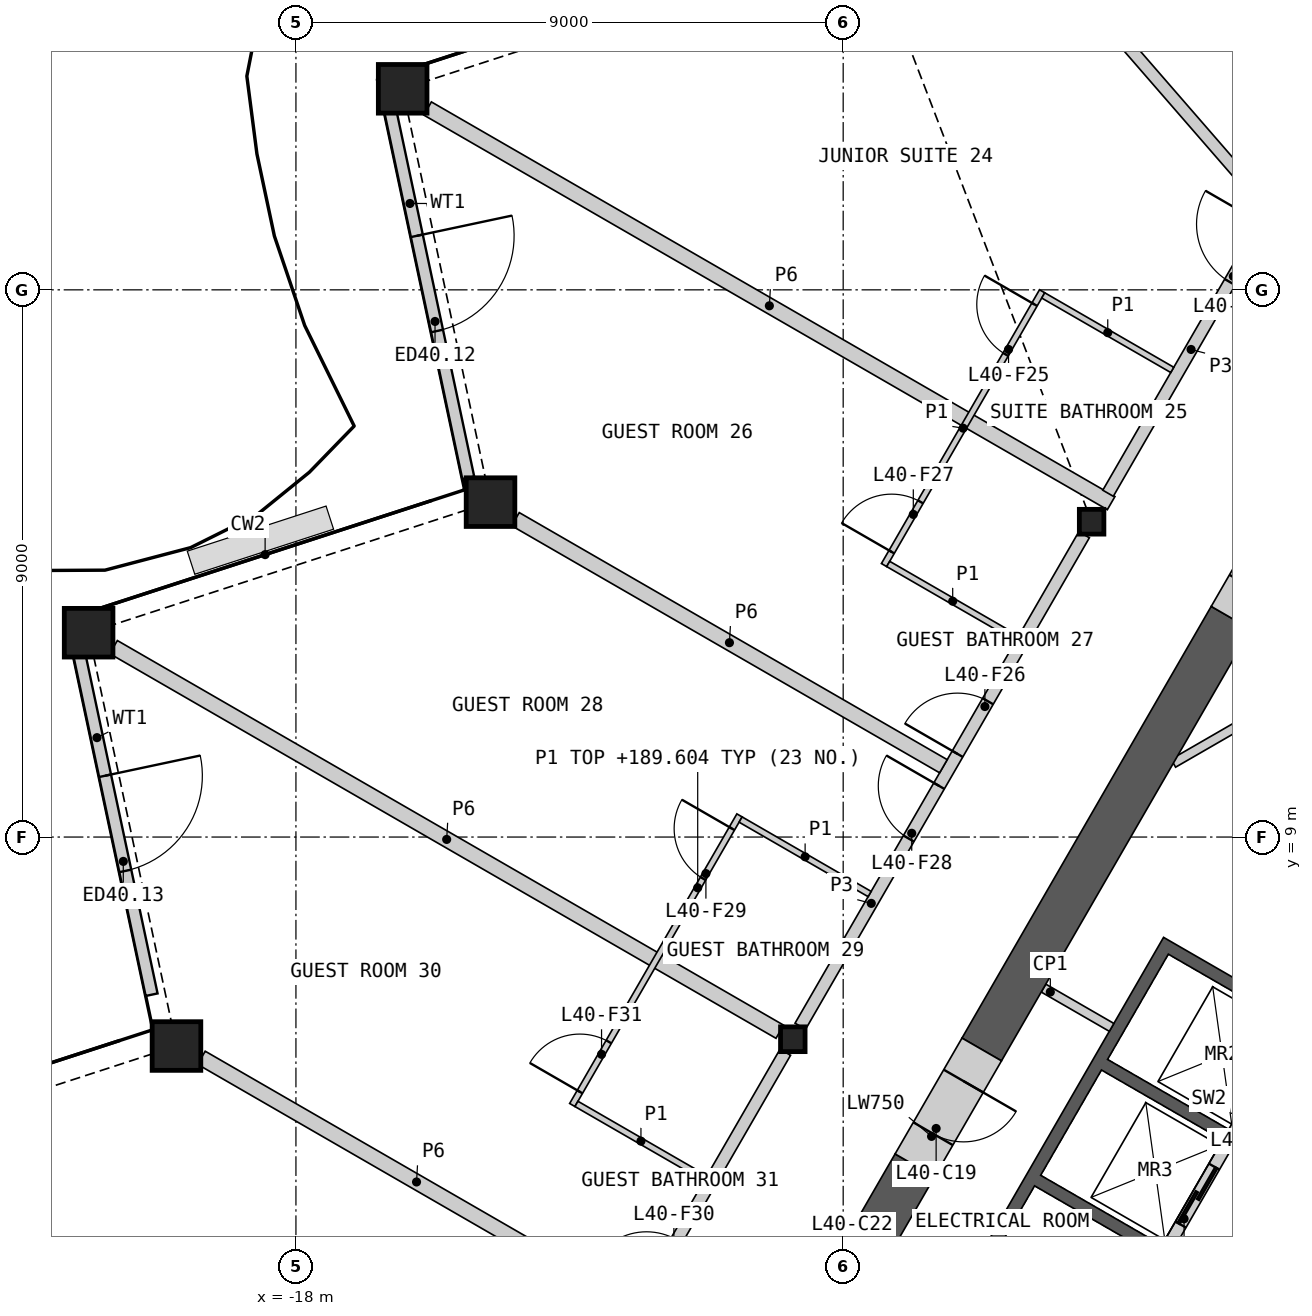
"""IFC4 building model, lengths in metres.
Left out: names, types, materials, properties, quantities, classifications, styles, units other than length and angle.
Written with IfcOpenShell. Run it as: python <this file> out.ifc"""

import sys

from ifc_helpers import new_model, si_unit, direction, frame, frame_2d, origin, origin_2d, place, context, subcontext, project, spatial, polyline, rectangle, hollow_rectangle, i_section, outline, extrude, element, fill, save


model = new_model("IFC4")
c1 = context("Model", 3, precision=1e-05, world=origin(), true_north=direction((0.0, 1.0)))
c2 = subcontext(c1, "Body", "Model", "MODEL_VIEW")
j1 = project(units=[si_unit("LENGTHUNIT", "METRE"), si_unit("PLANEANGLEUNIT", "RADIAN")], contexts=[c1])
p1 = place(None, origin())
s1 = spatial("IfcSite", under=j1, at=p1, CompositionType="ELEMENT")
p2 = place(p1, origin())
s2 = spatial("IfcBuilding", under=s1, at=p2, CompositionType="ELEMENT")
p3 = place(p2, frame((0.0, 0.0, 187.2)))
s3 = spatial("IfcBuildingStorey", under=s2, at=p3, CompositionType="ELEMENT", Elevation=187.2)
for number, where, z_axis, x_axis in (
    (1, (-16.245, 21.306, 0.0), (0.0, 0.0, 1.0), (1.0, 0.0, 0.0)),
    (2, (-14.8, 14.508, 0.0), (0.0, 0.0, 1.0), (1.0, 0.0, 0.0)),
    (3, (-21.409, 12.361, 0.0), (0.0, 0.0, 1.0), (1.0, 0.0, 0.0)),
    (4, (-19.965, 5.563, 0.0), (0.0, 0.0, 1.0), (1.0, 0.0, 0.0)),
):
    element("IfcColumn", number, at=place(p3, frame(where, z_axis=z_axis, x_axis=x_axis)), inside=s3, PredefinedType="COLUMN", context=c2, shape_type="SweptSolid", body=[
        extrude(hollow_rectangle(XDim=0.8, YDim=0.8, WallThickness=0.05, at=origin_2d()), origin(), (0.0, 0.0, 1.0), 3.6),
    ])
for number, where, z_axis, x_axis in (
    (5, (-4.914, 14.186, 0.0), (0.0, 0.0, 1.0), (1.0, 0.0, 0.0)),
    (6, (-9.828, 5.675, 0.0), (0.0, 0.0, 1.0), (1.0, 0.0, 0.0)),
):
    element("IfcColumn", number, at=place(p3, frame(where, z_axis=z_axis, x_axis=x_axis)), inside=s3, PredefinedType="COLUMN", context=c2, shape_type="SweptSolid", body=[
        extrude(i_section(OverallWidth=0.404, OverallDepth=0.407, WebThickness=0.027, FlangeThickness=0.044, at=origin_2d()), origin(), (0.0, 0.0, 1.0), 3.6),
    ])
p4 = place(p3, frame((-16.445, 20.925, 0.0), z_axis=(0.0, 0.0, 1.0), x_axis=(0.20791050027, -0.978147853792, 0.0)))
e7 = element("IfcWall", 7, at=p4, inside=s3, PredefinedType="SOLIDWALL", context=c2, shape_type="SweptSolid", body=[
    extrude(rectangle(XDim=6.151, YDim=0.2, at=frame_2d((3.075, 0.0))), origin(), (0.0, 0.0, 1.0), 2.701),
])
p5 = place(p4, frame((2.082, 0.0, 0.0)))
e8 = element("IfcOpeningElement", 8, at=p5, cuts=e7, PredefinedType="OPENING", context=c2, shape_type="SweptSolid", body=[
    extrude(rectangle(XDim=1.6, YDim=2.4, at=frame_2d((0.8, 1.2))), frame((0.0, 0.11, 0.0), z_axis=(0.0, -1.0, 0.0), x_axis=(1.0, 0.0, 0.0)), (0.0, 0.0, 1.0), 0.22),
])
p6 = place(p3, frame((-21.572, 12.044, 0.0), z_axis=(0.0, 0.0, 1.0), x_axis=(0.207914487103, -0.978147006361, 0.0)))
e9 = element("IfcWall", 9, at=p6, inside=s3, PredefinedType="SOLIDWALL", context=c2, shape_type="SweptSolid", body=[
    extrude(rectangle(XDim=5.763, YDim=0.2, at=frame_2d((2.882, 0.0))), origin(), (0.0, 0.0, 1.0), 2.701),
])
p7 = place(p6, frame((2.082, 0.0, 0.0)))
e10 = element("IfcOpeningElement", 10, at=p7, cuts=e9, PredefinedType="OPENING", context=c2, shape_type="SweptSolid", body=[
    extrude(rectangle(XDim=1.6, YDim=2.4, at=frame_2d((0.8, 1.2))), frame((0.0, 0.11, 0.0), z_axis=(0.0, -1.0, 0.0), x_axis=(1.0, 0.0, 0.0)), (0.0, 0.0, 1.0), 0.22),
])
p8 = place(p3, origin())
e11 = element("IfcWall", 11, at=p8, inside=s3, PredefinedType="SHEAR", context=c2, shape_type="SweptSolid", body=[
    extrude(outline(polyline([(-4.96, 0.208), (-7.131, 1.461), (-3.731, 7.35), (-1.561, 6.097), (-1.66, 5.924), (-3.652, 7.074), (-4.652, 5.342), (-2.66, 4.192), (-2.76, 4.019), (-4.752, 5.169), (-5.752, 3.437), (-3.76, 2.287), (-3.861, 2.113), (-5.852, 3.263), (-6.852, 1.531), (-4.861, 0.381), (-4.96, 0.208)])), origin(), (0.0, 0.0, 1.0), 3.25),
])
p9 = place(p3, frame((-1.631, 5.776, 0.0), z_axis=(0.0, 0.0, 1.0), x_axis=(-0.499992876559, -0.866029516466, 0.0)))
e12 = element("IfcWall", 12, at=p9, inside=s3, PredefinedType="SOLIDWALL", context=c2, shape_type="SweptSolid", body=[
    extrude(rectangle(XDim=6.486, YDim=0.2, at=frame_2d((3.243, 0.0))), origin(), (0.0, 0.0, 1.0), 3.25),
])
p10 = place(p9, frame((0.337, 0.0, 0.0)))
e13 = element("IfcOpeningElement", 13, at=p10, cuts=e12, PredefinedType="OPENING", context=c2, shape_type="SweptSolid", body=[
    extrude(rectangle(XDim=1.1, YDim=2.1, at=frame_2d((0.55, 1.05))), frame((0.0, 0.11, 0.0), z_axis=(0.0, -1.0, 0.0), x_axis=(1.0, 0.0, 0.0)), (0.0, 0.0, 1.0), 0.22),
])
p11 = place(p9, frame((2.537, 0.0, 0.0)))
e14 = element("IfcOpeningElement", 14, at=p11, cuts=e12, PredefinedType="OPENING", context=c2, shape_type="SweptSolid", body=[
    extrude(rectangle(XDim=1.1, YDim=2.1, at=frame_2d((0.55, 1.05))), frame((0.0, 0.11, 0.0), z_axis=(0.0, -1.0, 0.0), x_axis=(1.0, 0.0, 0.0)), (0.0, 0.0, 1.0), 0.22),
])
p12 = place(p3, frame((-5.705, 6.516, 0.0), z_axis=(0.0, 0.0, 1.0), x_axis=(0.866003189247, -0.500038474733, 0.0)))
e15 = element("IfcWall", 15, at=p12, inside=s3, PredefinedType="PARTITIONING", context=c2, shape_type="SweptSolid", body=[
    extrude(rectangle(XDim=1.293, YDim=0.15, at=frame_2d((0.646, 0.0))), origin(), (0.0, 0.0, 1.0), 3.25),
])
p13 = place(p3, frame((1.785, 13.306, 0.0), z_axis=(0.0, 0.0, 1.0), x_axis=(-0.866038319186, -0.499977629202, 0.0)))
e16 = element("IfcWall", 16, at=p13, inside=s3, PredefinedType="PARTITIONING", context=c2, shape_type="SweptSolid", body=[
    extrude(rectangle(XDim=6.184, YDim=0.15, at=frame_2d((3.092, 0.0))), origin(), (0.0, 0.0, 1.0), 3.25),
])
p14 = place(p3, frame((-2.622, 12.606, 0.0), z_axis=(0.0, 0.0, 1.0), x_axis=(-0.500014611105, -0.866016967894, 0.0)))
e17 = element("IfcWall", 17, at=p14, inside=s3, PredefinedType="SHEAR", context=c2, shape_type="SweptSolid", body=[
    extrude(rectangle(XDim=8.198, YDim=0.75, at=frame_2d((4.099, 0.0))), origin(), (0.0, 0.0, 1.0), 3.25),
])
p15 = place(p3, frame((-7.821, 3.601, 0.0), z_axis=(0.0, 0.0, 1.0), x_axis=(-0.49996263964, -0.866046972724, 0.0)))
e18 = element("IfcWall", 18, at=p15, inside=s3, PredefinedType="SHEAR", context=c2, shape_type="SweptSolid", body=[
    extrude(rectangle(XDim=1.408, YDim=0.75, at=frame_2d((0.704, 0.0))), origin(), (0.0, 0.0, 1.0), 3.25),
])
p16 = place(p3, frame((-6.721, 5.506, 0.0), z_axis=(0.0, 0.0, 1.0), x_axis=(-0.499946605688, -0.86605622881, 0.0)))
e19 = element("IfcWall", 19, at=p16, inside=s3, PredefinedType="SHEAR", context=c2, shape_type="SweptSolid", body=[
    extrude(rectangle(XDim=2.2, YDim=0.75, at=frame_2d((1.1, 0.0))), origin(), (0.0, 0.0, 1.0), 3.25),
])
p17 = place(p16, frame((0.6, 0.0, 0.0)))
e20 = element("IfcOpeningElement", 20, at=p17, cuts=e19, PredefinedType="OPENING", context=c2, shape_type="SweptSolid", body=[
    extrude(rectangle(XDim=1.0, YDim=2.1, at=frame_2d((0.5, 1.05))), frame((0.0, 0.385, 0.0), z_axis=(0.0, -1.0, 0.0), x_axis=(1.0, 0.0, 0.0)), (0.0, 0.0, 1.0), 0.77),
])
p18 = place(p3, frame((-1.522, 14.511, 0.0), z_axis=(0.0, 0.0, 1.0), x_axis=(-0.499946605688, -0.86605622881, 0.0)))
e21 = element("IfcWall", 21, at=p18, inside=s3, PredefinedType="SHEAR", context=c2, shape_type="SweptSolid", body=[
    extrude(rectangle(XDim=2.2, YDim=0.75, at=frame_2d((1.1, 0.0))), origin(), (0.0, 0.0, 1.0), 3.25),
])
p19 = place(p18, frame((0.6, 0.0, 0.0)))
e22 = element("IfcOpeningElement", 22, at=p19, cuts=e21, PredefinedType="OPENING", context=c2, shape_type="SweptSolid", body=[
    extrude(rectangle(XDim=1.0, YDim=2.1, at=frame_2d((0.5, 1.05))), frame((0.0, 0.385, 0.0), z_axis=(0.0, -1.0, 0.0), x_axis=(1.0, 0.0, 0.0)), (0.0, 0.0, 1.0), 0.77),
])
p20 = place(p3, frame((-8.525, 2.382, 0.0), z_axis=(0.0, 0.0, 1.0), x_axis=(-0.500077893725, -0.86598042715, 0.0)))
e23 = element("IfcWall", 23, at=p20, inside=s3, PredefinedType="SHEAR", context=c2, shape_type="SweptSolid", body=[
    extrude(rectangle(XDim=2.2, YDim=0.75, at=frame_2d((1.1, 0.0))), origin(), (0.0, 0.0, 1.0), 3.25),
])
p21 = place(p20, frame((0.55, 0.0, 0.0)))
e24 = element("IfcOpeningElement", 24, at=p21, cuts=e23, PredefinedType="OPENING", context=c2, shape_type="SweptSolid", body=[
    extrude(rectangle(XDim=1.1, YDim=2.1, at=frame_2d((0.55, 1.05))), frame((0.0, 0.385, 0.0), z_axis=(0.0, -1.0, 0.0), x_axis=(1.0, 0.0, 0.0)), (0.0, 0.0, 1.0), 0.77),
])
p22 = place(p3, frame((-26.164, 3.265, 0.0), z_axis=(0.0, 0.0, 1.0), x_axis=(0.866021313335, -0.500007084799, 0.0)))
e25 = element("IfcWall", 25, at=p22, inside=s3, PredefinedType="PARTITIONING", context=c2, shape_type="SweptSolid", body=[
    extrude(rectangle(XDim=13.068, YDim=0.25, at=frame_2d((6.534, 0.0))), origin(), (0.0, 0.0, 1.0), 2.404),
])
p23 = place(p3, frame((-15.835, 20.983, 0.0), z_axis=(0.0, 0.0, 1.0), x_axis=(0.866022720283, -0.500004647933, 0.0)))
e26 = element("IfcWall", 26, at=p23, inside=s3, PredefinedType="PARTITIONING", context=c2, shape_type="SweptSolid", body=[
    extrude(rectangle(XDim=12.981, YDim=0.25, at=frame_2d((6.49, 0.0))), origin(), (0.0, 0.0, 1.0), 2.404),
])
p24 = place(p3, frame((-21.0, 12.124, 0.0), z_axis=(0.0, 0.0, 1.0), x_axis=(0.866025883649, -0.499999168849, 0.0)))
e27 = element("IfcWall", 27, at=p24, inside=s3, PredefinedType="PARTITIONING", context=c2, shape_type="SweptSolid", body=[
    extrude(rectangle(XDim=12.652, YDim=0.25, at=frame_2d((6.326, 0.0))), origin(), (0.0, 0.0, 1.0), 2.404),
])
p25 = place(p3, frame((-9.705, 5.888, 0.0), z_axis=(0.0, 0.0, 1.0), x_axis=(0.50000393355, 0.866023132736, 0.0)))
e28 = element("IfcWall", 28, at=p25, inside=s3, PredefinedType="PARTITIONING", context=c2, shape_type="SweptSolid", body=[
    extrude(rectangle(XDim=9.335, YDim=0.2, at=frame_2d((4.667, 0.0))), origin(), (0.0, 0.0, 1.0), 3.25),
])
p26 = place(p25, frame((5.172, 0.0, 0.0)))
e29 = element("IfcOpeningElement", 29, at=p26, cuts=e28, PredefinedType="OPENING", context=c2, shape_type="SweptSolid", body=[
    extrude(rectangle(XDim=1.0, YDim=2.1, at=frame_2d((0.5, 1.05))), frame((0.0, 0.11, 0.0), z_axis=(0.0, -1.0, 0.0), x_axis=(1.0, 0.0, 0.0)), (0.0, 0.0, 1.0), 0.22),
])
p27 = place(p25, frame((3.565, 0.0, 0.0)))
e30 = element("IfcOpeningElement", 30, at=p27, cuts=e28, PredefinedType="OPENING", context=c2, shape_type="SweptSolid", body=[
    extrude(rectangle(XDim=1.0, YDim=2.1, at=frame_2d((0.5, 1.05))), frame((0.0, 0.11, 0.0), z_axis=(0.0, -1.0, 0.0), x_axis=(1.0, 0.0, 0.0)), (0.0, 0.0, 1.0), 0.22),
])
p28 = place(p3, frame((-14.619, -2.624, 0.0), z_axis=(0.0, 0.0, 1.0), x_axis=(0.50000393355, 0.866023132736, 0.0)))
e31 = element("IfcWall", 31, at=p28, inside=s3, PredefinedType="PARTITIONING", context=c2, shape_type="SweptSolid", body=[
    extrude(rectangle(XDim=9.335, YDim=0.2, at=frame_2d((4.667, 0.0))), origin(), (0.0, 0.0, 1.0), 3.25),
])
p29 = place(p28, frame((4.77, 0.0, 0.0)))
e32 = element("IfcOpeningElement", 32, at=p29, cuts=e31, PredefinedType="OPENING", context=c2, shape_type="SweptSolid", body=[
    extrude(rectangle(XDim=1.0, YDim=2.1, at=frame_2d((0.5, 1.05))), frame((0.0, 0.11, 0.0), z_axis=(0.0, -1.0, 0.0), x_axis=(1.0, 0.0, 0.0)), (0.0, 0.0, 1.0), 0.22),
])
p30 = place(p28, frame((3.163, 0.0, 0.0)))
e33 = element("IfcOpeningElement", 33, at=p30, cuts=e31, PredefinedType="OPENING", context=c2, shape_type="SweptSolid", body=[
    extrude(rectangle(XDim=1.0, YDim=2.1, at=frame_2d((0.5, 1.05))), frame((0.0, 0.11, 0.0), z_axis=(0.0, -1.0, 0.0), x_axis=(1.0, 0.0, 0.0)), (0.0, 0.0, 1.0), 0.22),
])
p31 = place(p3, frame((-19.555, 5.37, 0.0), z_axis=(0.0, 0.0, 1.0), x_axis=(0.866024371346, -0.500001788232, 0.0)))
e34 = element("IfcWall", 34, at=p31, inside=s3, PredefinedType="PARTITIONING", context=c2, shape_type="SweptSolid", body=[
    extrude(rectangle(XDim=8.171, YDim=0.25, at=frame_2d((4.085, 0.0))), origin(), (0.0, 0.0, 1.0), 2.404),
])
p32 = place(p3, frame((-14.39, 14.228, 0.0), z_axis=(0.0, 0.0, 1.0), x_axis=(0.866031008936, -0.499990291468, 0.0)))
e35 = element("IfcWall", 35, at=p32, inside=s3, PredefinedType="PARTITIONING", context=c2, shape_type="SweptSolid", body=[
    extrude(rectangle(XDim=8.127, YDim=0.25, at=frame_2d((4.063, 0.0))), origin(), (0.0, 0.0, 1.0), 2.404),
])
p33 = place(p3, frame((-4.644, 14.655, 0.0), z_axis=(0.0, 0.0, 1.0), x_axis=(0.49998041698, 0.866036709751, 0.0)))
e36 = element("IfcWall", 36, at=p33, inside=s3, PredefinedType="PARTITIONING", context=c2, shape_type="SweptSolid", body=[
    extrude(rectangle(XDim=5.462, YDim=0.2, at=frame_2d((2.731, 0.0))), origin(), (0.0, 0.0, 1.0), 3.25),
])
p34 = place(p33, frame((4.01, 0.0, 0.0)))
e37 = element("IfcOpeningElement", 37, at=p34, cuts=e36, PredefinedType="OPENING", context=c2, shape_type="SweptSolid", body=[
    extrude(rectangle(XDim=1.1, YDim=2.1, at=frame_2d((0.55, 1.05))), frame((0.0, 0.11, 0.0), z_axis=(0.0, -1.0, 0.0), x_axis=(1.0, 0.0, 0.0)), (0.0, 0.0, 1.0), 0.22),
])
p35 = place(p3, frame((-11.122, 29.842, 0.0), z_axis=(0.0, 0.0, 1.0), x_axis=(0.65579678992, -0.754937461205, 0.0)))
e38 = element("IfcWall", 38, at=p35, inside=s3, PredefinedType="PARTITIONING", context=c2, shape_type="SweptSolid", body=[
    extrude(rectangle(XDim=13.867, YDim=0.2, at=frame_2d((6.933, 0.0))), origin(), (0.0, 0.0, 1.0), 2.404),
])
p36 = place(p3, frame((-13.455, 4.593, 0.0), z_axis=(0.0, 0.0, 1.0), x_axis=(0.500015767406, 0.866016300277, 0.0)))
e39 = element("IfcWall", 39, at=p36, inside=s3, PredefinedType="PARTITIONING", context=c2, shape_type="SweptSolid", body=[
    extrude(rectangle(XDim=5.5, YDim=0.1, at=frame_2d((2.75, 0.0))), origin(), (0.0, 0.0, 1.0), 2.404),
])
p37 = place(p36, frame((4.3, 0.0, 0.0)))
e40 = element("IfcOpeningElement", 40, at=p37, cuts=e39, PredefinedType="OPENING", context=c2, shape_type="SweptSolid", body=[
    extrude(rectangle(XDim=0.95, YDim=2.1, at=frame_2d((0.475, 1.05))), frame((0.0, 0.06, 0.0), z_axis=(0.0, -1.0, 0.0), x_axis=(1.0, 0.0, 0.0)), (0.0, 0.0, 1.0), 0.12),
])
p38 = place(p36, frame((0.25, 0.0, 0.0)))
e41 = element("IfcOpeningElement", 41, at=p38, cuts=e39, PredefinedType="OPENING", context=c2, shape_type="SweptSolid", body=[
    extrude(rectangle(XDim=0.95, YDim=2.1, at=frame_2d((0.475, 1.05))), frame((0.0, 0.06, 0.0), z_axis=(0.0, -1.0, 0.0), x_axis=(1.0, 0.0, 0.0)), (0.0, 0.0, 1.0), 0.12),
])
p39 = place(p3, frame((-8.328, 13.473, 0.0), z_axis=(0.0, 0.0, 1.0), x_axis=(0.499992051641, 0.866029992723, 0.0)))
e42 = element("IfcWall", 42, at=p39, inside=s3, PredefinedType="PARTITIONING", context=c2, shape_type="SweptSolid", body=[
    extrude(rectangle(XDim=5.2, YDim=0.1, at=frame_2d((2.6, 0.0))), origin(), (0.0, 0.0, 1.0), 2.404),
])
p40 = place(p39, frame((4.0, 0.0, 0.0)))
e43 = element("IfcOpeningElement", 43, at=p40, cuts=e42, PredefinedType="OPENING", context=c2, shape_type="SweptSolid", body=[
    extrude(rectangle(XDim=0.95, YDim=2.1, at=frame_2d((0.475, 1.05))), frame((0.0, 0.06, 0.0), z_axis=(0.0, -1.0, 0.0), x_axis=(1.0, 0.0, 0.0)), (0.0, 0.0, 1.0), 0.12),
])
p41 = place(p39, frame((0.25, 0.0, 0.0)))
e44 = element("IfcOpeningElement", 44, at=p41, cuts=e42, PredefinedType="OPENING", context=c2, shape_type="SweptSolid", body=[
    extrude(rectangle(XDim=0.95, YDim=2.1, at=frame_2d((0.475, 1.05))), frame((0.0, 0.06, 0.0), z_axis=(0.0, -1.0, 0.0), x_axis=(1.0, 0.0, 0.0)), (0.0, 0.0, 1.0), 0.12),
])
p42 = place(p3, frame((-13.387, 4.611, 0.0), z_axis=(0.0, 0.0, 1.0), x_axis=(0.866032905446, -0.499987006516, 0.0)))
e45 = element("IfcWall", 45, at=p42, inside=s3, PredefinedType="PARTITIONING", context=c2, shape_type="SweptSolid", body=[
    extrude(rectangle(XDim=2.45, YDim=0.1, at=frame_2d((1.225, 0.0))), origin(), (0.0, 0.0, 1.0), 2.404),
])
p43 = place(p3, frame((-5.71, 17.908, 0.0), z_axis=(0.0, 0.0, 1.0), x_axis=(0.866057815567, -0.499943856944, 0.0)))
e46 = element("IfcWall", 46, at=p43, inside=s3, PredefinedType="PARTITIONING", context=c2, shape_type="SweptSolid", body=[
    extrude(rectangle(XDim=2.45, YDim=0.1, at=frame_2d((1.225, 0.0))), origin(), (0.0, 0.0, 1.0), 2.404),
])
p44 = place(p3, frame((-8.26, 13.492, 0.0), z_axis=(0.0, 0.0, 1.0), x_axis=(0.866014668023, -0.500018594424, 0.0)))
e47 = element("IfcWall", 47, at=p44, inside=s3, PredefinedType="PARTITIONING", context=c2, shape_type="SweptSolid", body=[
    extrude(rectangle(XDim=2.45, YDim=0.1, at=frame_2d((1.225, 0.0))), origin(), (0.0, 0.0, 1.0), 2.404),
])
p45 = place(p3, frame((-10.687, 9.288, 0.0), z_axis=(0.0, 0.0, 1.0), x_axis=(0.866032905446, -0.499987006516, 0.0)))
e48 = element("IfcWall", 48, at=p45, inside=s3, PredefinedType="PARTITIONING", context=c2, shape_type="SweptSolid", body=[
    extrude(rectangle(XDim=2.45, YDim=0.1, at=frame_2d((1.225, 0.0))), origin(), (0.0, 0.0, 1.0), 2.404),
])
p46 = place(p5, origin())
e49 = element("IfcDoor", 49, at=p46, inside=s3, OperationType="DOUBLE_DOOR_SINGLE_SWING", PredefinedType="DOOR", context=c2, shape_type="SweptSolid", body=[
    extrude(rectangle(XDim=1.6, YDim=2.4, at=frame_2d((0.8, 1.2))), frame((0.0, 0.025, 0.0), z_axis=(0.0, -1.0, 0.0), x_axis=(1.0, 0.0, 0.0)), (0.0, 0.0, 1.0), 0.05),
])
fill(e8, e49)
p47 = place(p7, origin())
e50 = element("IfcDoor", 50, at=p47, inside=s3, OperationType="DOUBLE_DOOR_SINGLE_SWING", PredefinedType="DOOR", context=c2, shape_type="SweptSolid", body=[
    extrude(rectangle(XDim=1.6, YDim=2.4, at=frame_2d((0.8, 1.2))), frame((0.0, 0.025, 0.0), z_axis=(0.0, -1.0, 0.0), x_axis=(1.0, 0.0, 0.0)), (0.0, 0.0, 1.0), 0.05),
])
fill(e10, e50)
p48 = place(p11, origin())
e51 = element("IfcDoor", 51, at=p48, inside=s3, OperationType="SLIDING_TO_LEFT", PredefinedType="DOOR", context=c2, shape_type="SweptSolid", body=[
    extrude(rectangle(XDim=1.1, YDim=2.1, at=frame_2d((0.55, 1.05))), frame((0.0, 0.025, 0.0), z_axis=(0.0, -1.0, 0.0), x_axis=(1.0, 0.0, 0.0)), (0.0, 0.0, 1.0), 0.05),
])
fill(e14, e51)
p49 = place(p17, origin())
e52 = element("IfcDoor", 52, at=p49, inside=s3, OperationType="SINGLE_SWING_LEFT", PredefinedType="DOOR", context=c2, shape_type="SweptSolid", body=[
    extrude(rectangle(XDim=1.0, YDim=2.1, at=frame_2d((0.5, 1.05))), frame((0.0, 0.13, 0.0), z_axis=(0.0, -1.0, 0.0), x_axis=(1.0, 0.0, 0.0)), (0.0, 0.0, 1.0), 0.05),
])
fill(e20, e52)
p50 = place(p34, origin())
e53 = element("IfcDoor", 53, at=p50, inside=s3, OperationType="SINGLE_SWING_RIGHT", PredefinedType="DOOR", context=c2, shape_type="SweptSolid", body=[
    extrude(rectangle(XDim=1.1, YDim=2.1, at=frame_2d((0.55, 1.05))), frame((0.0, 0.025, 0.0), z_axis=(0.0, -1.0, 0.0), x_axis=(1.0, 0.0, 0.0)), (0.0, 0.0, 1.0), 0.05),
])
fill(e37, e53)
p51 = place(p40, origin())
e54 = element("IfcDoor", 54, at=p51, inside=s3, OperationType="SINGLE_SWING_RIGHT", PredefinedType="DOOR", context=c2, shape_type="SweptSolid", body=[
    extrude(rectangle(XDim=0.95, YDim=2.1, at=frame_2d((0.475, 1.05))), frame((0.0, 0.025, 0.0), z_axis=(0.0, -1.0, 0.0), x_axis=(1.0, 0.0, 0.0)), (0.0, 0.0, 1.0), 0.05),
])
fill(e43, e54)
p52 = place(p26, origin())
e55 = element("IfcDoor", 55, at=p52, inside=s3, OperationType="SINGLE_SWING_LEFT", PredefinedType="DOOR", context=c2, shape_type="SweptSolid", body=[
    extrude(rectangle(XDim=1.0, YDim=2.1, at=frame_2d((0.5, 1.05))), frame((0.0, 0.025, 0.0), z_axis=(0.0, -1.0, 0.0), x_axis=(1.0, 0.0, 0.0)), (0.0, 0.0, 1.0), 0.05),
])
fill(e29, e55)
p53 = place(p41, origin())
e56 = element("IfcDoor", 56, at=p53, inside=s3, OperationType="SINGLE_SWING_LEFT", PredefinedType="DOOR", context=c2, shape_type="SweptSolid", body=[
    extrude(rectangle(XDim=0.95, YDim=2.1, at=frame_2d((0.475, 1.05))), frame((0.0, 0.025, 0.0), z_axis=(0.0, -1.0, 0.0), x_axis=(1.0, 0.0, 0.0)), (0.0, 0.0, 1.0), 0.05),
])
fill(e44, e56)
p54 = place(p27, origin())
e57 = element("IfcDoor", 57, at=p54, inside=s3, OperationType="SINGLE_SWING_RIGHT", PredefinedType="DOOR", context=c2, shape_type="SweptSolid", body=[
    extrude(rectangle(XDim=1.0, YDim=2.1, at=frame_2d((0.5, 1.05))), frame((0.0, 0.025, 0.0), z_axis=(0.0, -1.0, 0.0), x_axis=(1.0, 0.0, 0.0)), (0.0, 0.0, 1.0), 0.05),
])
fill(e30, e57)
p55 = place(p37, origin())
e58 = element("IfcDoor", 58, at=p55, inside=s3, OperationType="SINGLE_SWING_RIGHT", PredefinedType="DOOR", context=c2, shape_type="SweptSolid", body=[
    extrude(rectangle(XDim=0.95, YDim=2.1, at=frame_2d((0.475, 1.05))), frame((0.0, 0.025, 0.0), z_axis=(0.0, -1.0, 0.0), x_axis=(1.0, 0.0, 0.0)), (0.0, 0.0, 1.0), 0.05),
])
fill(e40, e58)
p56 = place(p38, origin())
e59 = element("IfcDoor", 59, at=p56, inside=s3, OperationType="SINGLE_SWING_LEFT", PredefinedType="DOOR", context=c2, shape_type="SweptSolid", body=[
    extrude(rectangle(XDim=0.95, YDim=2.1, at=frame_2d((0.475, 1.05))), frame((0.0, 0.025, 0.0), z_axis=(0.0, -1.0, 0.0), x_axis=(1.0, 0.0, 0.0)), (0.0, 0.0, 1.0), 0.05),
])
fill(e41, e59)
save(model, sys.argv[1])
